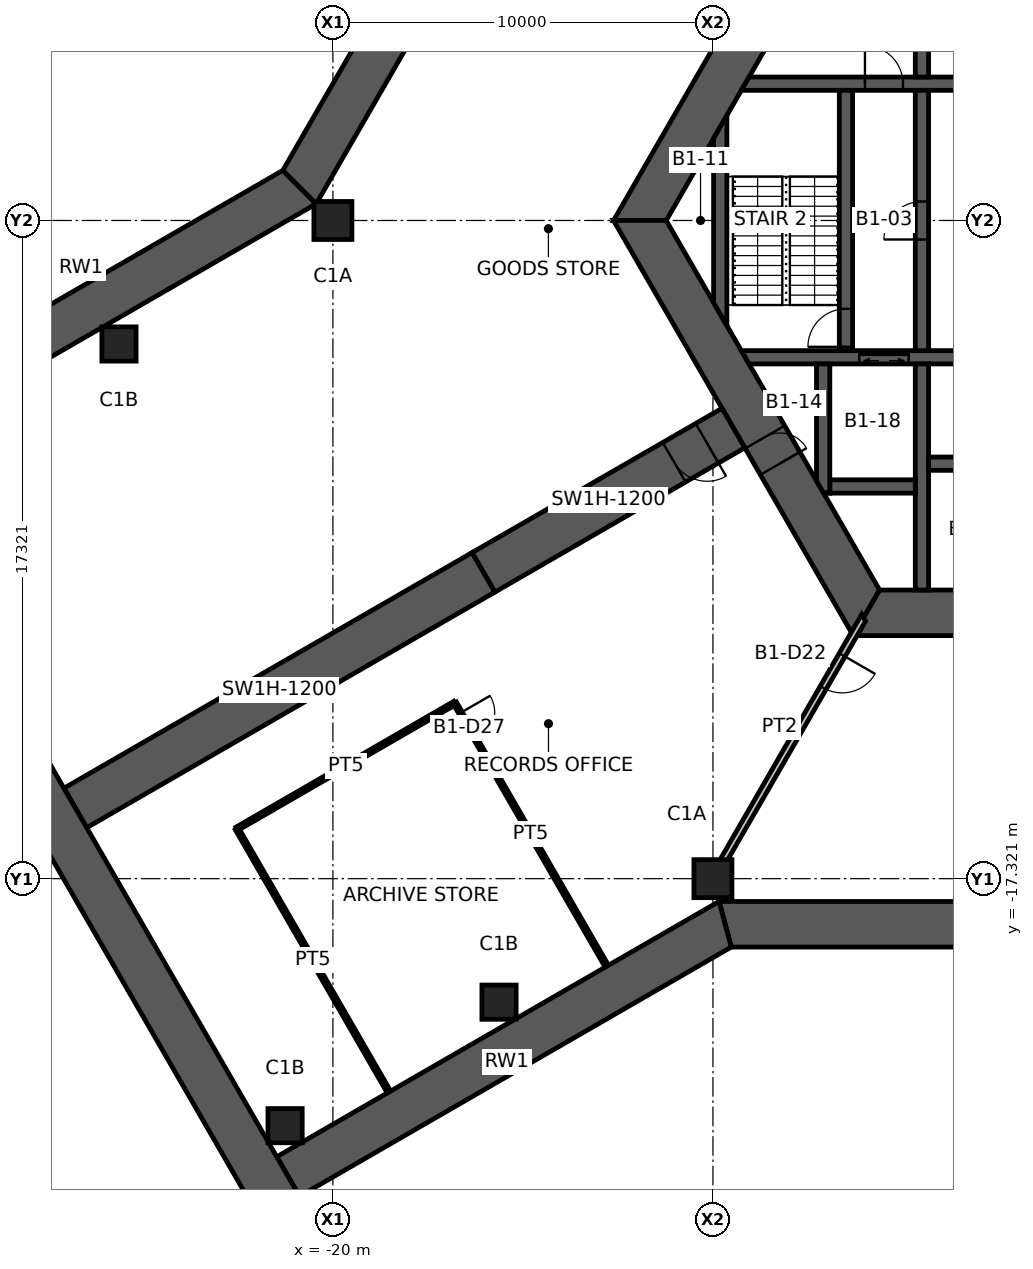
"""IFC4 building model, lengths in metres.
Left out: names, types, materials, properties, quantities, classifications, styles, units other than length and angle.
Written with IfcOpenShell. Run it as: python <this file> out.ifc"""

import sys

from ifc_helpers import new_model, si_unit, direction, frame, frame_2d, origin, origin_2d, place, context, subcontext, project, spatial, polyline, rectangle, hollow_rectangle, outline, extrude, element, fill, save


model = new_model("IFC4")
c1 = context("Model", 3, precision=1e-05, world=origin(), true_north=direction((0.0, 1.0)))
c2 = subcontext(c1, "Body", "Model", "MODEL_VIEW")
j1 = project(units=[si_unit("LENGTHUNIT", "METRE"), si_unit("PLANEANGLEUNIT", "RADIAN")], contexts=[c1])
p1 = place(None, origin())
s1 = spatial("IfcSite", under=j1, at=p1, CompositionType="ELEMENT")
p2 = place(p1, origin())
s2 = spatial("IfcBuilding", under=s1, at=p2, CompositionType="ELEMENT")
p3 = place(p2, frame((0.0, 0.0, -5.0)))
s3 = spatial("IfcBuildingStorey", under=s2, at=p3, CompositionType="ELEMENT", Elevation=-5.0)
for number, where, z_axis, x_axis in (
    (1, (-20.0, 0.0, 0.0), (0.0, 0.0, 1.0), (1.0, 0.0, 0.0)),
    (2, (-10.0, -17.321, 0.0), (0.0, 0.0, 1.0), (1.0, 0.0, 0.0)),
):
    element("IfcColumn", number, at=place(p3, frame(where, z_axis=z_axis, x_axis=x_axis)), inside=s3, PredefinedType="COLUMN", context=c2, shape_type="SweptSolid", body=[
        extrude(hollow_rectangle(XDim=1.0, YDim=1.0, WallThickness=0.06, at=origin_2d()), origin(), (0.0, 0.0, 1.0), 5.0),
    ])
for number, where, z_axis, x_axis in (
    (3, (-25.629, -3.25, 0.0), (0.0, 0.0, 1.0), (1.0, 0.0, 0.0)),
    (4, (-15.629, -20.571, 0.0), (0.0, 0.0, 1.0), (1.0, 0.0, 0.0)),
    (5, (-21.258, -23.821, 0.0), (0.0, 0.0, 1.0), (1.0, 0.0, 0.0)),
):
    element("IfcColumn", number, at=place(p3, frame(where, z_axis=z_axis, x_axis=x_axis)), inside=s3, PredefinedType="COLUMN", context=c2, shape_type="SweptSolid", body=[
        extrude(hollow_rectangle(XDim=0.9, YDim=0.9, WallThickness=0.05, at=origin_2d()), origin(), (0.0, 0.0, 1.0), 5.0),
    ])
p4 = place(p3, frame((-5.961, 10.325, 0.0), z_axis=(0.0, 0.0, 1.0), x_axis=(-0.500004296715, -0.866022923061, 0.0)))
e6 = element("IfcWall", 6, at=p4, inside=s3, PredefinedType="SHEAR", context=c2, shape_type="SweptSolid", body=[
    extrude(outline(polyline([(-0.346, -0.6), (4.494, -0.6), (5.494, -0.6), (12.269, -0.6), (11.576, 0.6), (5.494, 0.6), (4.494, 0.6), (0.346, 0.6), (-0.346, -0.6)])), origin(), (0.0, 0.0, 1.0), 5.0),
])
p5 = place(p4, frame((4.494, 0.0, 0.0)))
e7 = element("IfcOpeningElement", 7, at=p5, cuts=e6, PredefinedType="OPENING", context=c2, shape_type="SweptSolid", body=[
    extrude(rectangle(XDim=1.0, YDim=2.1, at=frame_2d((0.5, 1.05))), frame((0.0, 0.61, 0.0), z_axis=(0.0, -1.0, 0.0), x_axis=(1.0, 0.0, 0.0)), (0.0, 0.0, 1.0), 1.22),
])
p6 = place(p3, frame((-11.922, 0.0, 0.0), z_axis=(0.0, 0.0, 1.0), x_axis=(0.500004296715, -0.866022923061, 0.0)))
e8 = element("IfcWall", 8, at=p6, inside=s3, PredefinedType="SHEAR", context=c2, shape_type="SweptSolid", body=[
    extrude(outline(polyline([(-0.346, -0.6), (6.581, -0.6), (7.381, -0.6), (12.269, -0.6), (11.576, 0.6), (7.381, 0.6), (6.581, 0.6), (0.346, 0.6), (-0.346, -0.6)])), origin(), (0.0, 0.0, 1.0), 5.0),
])
p7 = place(p6, frame((6.581, 0.0, 0.0)))
e9 = element("IfcOpeningElement", 9, at=p7, cuts=e8, PredefinedType="OPENING", context=c2, shape_type="SweptSolid", body=[
    extrude(rectangle(XDim=0.8, YDim=2.1, at=frame_2d((0.4, 1.05))), frame((0.0, 0.61, 0.0), z_axis=(0.0, -1.0, 0.0), x_axis=(1.0, 0.0, 0.0)), (0.0, 0.0, 1.0), 1.22),
])
p8 = place(p3, frame((-5.961, -10.325, 0.0), z_axis=(0.0, 0.0, 1.0), x_axis=(1.0, 0.0, 0.0)))
e10 = element("IfcWall", 10, at=p8, inside=s3, PredefinedType="SHEAR", context=c2, shape_type="SweptSolid", body=[
    extrude(outline(polyline([(-0.346, -0.6), (5.461, -0.6), (6.461, -0.6), (12.269, -0.6), (11.576, 0.6), (6.461, 0.6), (5.461, 0.6), (0.346, 0.6), (-0.346, -0.6)])), origin(), (0.0, 0.0, 1.0), 5.0),
])
p9 = place(p8, frame((5.461, 0.0, 0.0)))
e11 = element("IfcOpeningElement", 11, at=p9, cuts=e10, PredefinedType="OPENING", context=c2, shape_type="SweptSolid", body=[
    extrude(rectangle(XDim=1.0, YDim=2.1, at=frame_2d((0.5, 1.05))), frame((0.0, 0.61, 0.0), z_axis=(0.0, -1.0, 0.0), x_axis=(1.0, 0.0, 0.0)), (0.0, 0.0, 1.0), 1.22),
])
p10 = place(p3, frame((-9.461, -5.462, 0.0), z_axis=(0.0, 0.0, 1.0), x_axis=(-0.866019116917, -0.500010889016, 0.0)))
e12 = element("IfcWall", 12, at=p10, inside=s3, PredefinedType="SHEAR", context=c2, shape_type="SweptSolid", body=[
    extrude(rectangle(XDim=7.595, YDim=1.2, at=frame_2d((3.798, 0.0))), origin(), (0.0, 0.0, 1.0), 5.0),
])
p11 = place(p10, frame((0.8, 0.0, 0.0)))
e13 = element("IfcOpeningElement", 13, at=p11, cuts=e12, PredefinedType="OPENING", context=c2, shape_type="SweptSolid", body=[
    extrude(rectangle(XDim=1.0, YDim=2.1, at=frame_2d((0.5, 1.05))), frame((0.0, 0.61, 0.0), z_axis=(0.0, -1.0, 0.0), x_axis=(1.0, 0.0, 0.0)), (0.0, 0.0, 1.0), 1.22),
])
p12 = place(p3, frame((-16.039, -9.26, 0.0), z_axis=(0.0, 0.0, 1.0), x_axis=(-0.866023285932, -0.50000366821, 0.0)))
e14 = element("IfcWall", 14, at=p12, inside=s3, PredefinedType="SHEAR", context=c2, shape_type="SweptSolid", body=[
    extrude(rectangle(XDim=12.4, YDim=1.2, at=frame_2d((6.2, 0.0))), origin(), (0.0, 0.0, 1.0), 5.0),
])
p13 = place(p3, frame((-32.378, -5.761, 0.0), z_axis=(0.0, 0.0, 1.0), x_axis=(0.866028209229, 0.499995140796, 0.0)))
e15 = element("IfcWall", 15, at=p13, inside=s3, PredefinedType="SOLIDWALL", context=c2, shape_type="SweptSolid", body=[
    extrude(outline(polyline([(0.0, -0.6), (13.439, -0.6), (13.118, 0.6), (0.0, 0.6), (0.0, -0.6)])), origin(), (0.0, 0.0, 1.0), 5.0),
])
for number, where, z_axis, x_axis in (
    (16, (-20.878, 0.878, 0.0), (0.0, 0.0, 1.0), (0.5, 0.866, 0.0)),
    (17, (9.678, -18.521, 0.0), (0.0, 0.0, 1.0), (-1.0, 0.0, 0.0)),
):
    element("IfcWall", number, at=place(p3, frame(where, z_axis=z_axis, x_axis=x_axis)), inside=s3, PredefinedType="SOLIDWALL", context=c2, shape_type="SweptSolid", body=[
        extrude(outline(polyline([(-0.161, -0.6), (19.518, -0.6), (19.196, 0.6), (0.161, 0.6), (-0.161, -0.6)])), origin(), (0.0, 0.0, 1.0), 5.0),
    ])
p14 = place(p3, frame((-9.678, -18.521, 0.0), z_axis=(0.0, 0.0, 1.0), x_axis=(-0.866028209229, -0.499995140796, 0.0)))
e18 = element("IfcWall", 18, at=p14, inside=s3, PredefinedType="SOLIDWALL", context=c2, shape_type="SweptSolid", body=[
    extrude(outline(polyline([(-0.161, -0.6), (13.279, -0.6), (13.279, 0.6), (0.161, 0.6), (-0.161, -0.6)])), origin(), (0.0, 0.0, 1.0), 5.0),
])
p15 = place(p3, frame((-21.397, -25.979, 0.0), z_axis=(0.0, 0.0, 1.0), x_axis=(-0.500005427746, 0.866022270051, 0.0)))
e19 = element("IfcWall", 19, at=p15, inside=s3, PredefinedType="SOLIDWALL", context=c2, shape_type="SweptSolid", body=[
    extrude(rectangle(XDim=23.6, YDim=1.2, at=frame_2d((11.8, 0.0))), origin(), (0.0, 0.0, 1.0), 5.0),
])
p16 = place(p3, frame((-9.151, 3.6, 0.0), z_axis=(0.0, 0.0, 1.0), x_axis=(1.0, 0.0, 0.0)))
e20 = element("IfcWall", 20, at=p16, inside=s3, PredefinedType="SHEAR", context=c2, shape_type="SweptSolid", body=[
    extrude(outline(polyline([(-0.101, -0.175), (3.151, -0.175), (4.151, -0.175), (7.726, -0.175), (7.726, 0.175), (4.151, 0.175), (3.151, 0.175), (0.101, 0.175), (-0.101, -0.175)])), origin(), (0.0, 0.0, 1.0), 5.0),
])
p17 = place(p16, frame((3.151, 0.0, 0.0)))
e21 = element("IfcOpeningElement", 21, at=p17, cuts=e20, PredefinedType="OPENING", context=c2, shape_type="SweptSolid", body=[
    extrude(rectangle(XDim=1.0, YDim=2.1, at=frame_2d((0.5, 1.05))), frame((0.0, 0.185, 0.0), z_axis=(0.0, -1.0, 0.0), x_axis=(1.0, 0.0, 0.0)), (0.0, 0.0, 1.0), 0.37),
])
p18 = place(p3, frame((-9.151, -3.6, 0.0), z_axis=(0.0, 0.0, 1.0), x_axis=(1.0, 0.0, 0.0)))
e22 = element("IfcWall", 22, at=p18, inside=s3, PredefinedType="SHEAR", context=c2, shape_type="SweptSolid", body=[
    extrude(outline(polyline([(0.101, -0.175), (3.001, -0.175), (4.301, -0.175), (7.726, -0.175), (7.726, 0.175), (4.301, 0.175), (3.001, 0.175), (-0.101, 0.175), (0.101, -0.175)])), origin(), (0.0, 0.0, 1.0), 5.0),
])
p19 = place(p18, frame((3.001, 0.0, 0.0)))
e23 = element("IfcOpeningElement", 23, at=p19, cuts=e22, PredefinedType="OPENING", context=c2, shape_type="SweptSolid", body=[
    extrude(rectangle(XDim=1.3, YDim=2.1, at=frame_2d((0.65, 1.05))), frame((0.0, 0.185, 0.0), z_axis=(0.0, -1.0, 0.0), x_axis=(1.0, 0.0, 0.0)), (0.0, 0.0, 1.0), 0.37),
])
p20 = place(p3, frame((-4.5, -3.425, 0.0), z_axis=(0.0, 0.0, 1.0), x_axis=(0.0, 1.0, 0.0)))
e24 = element("IfcWall", 24, at=p20, inside=s3, PredefinedType="SHEAR", context=c2, shape_type="SweptSolid", body=[
    extrude(rectangle(XDim=6.85, YDim=0.35, at=frame_2d((3.425, 0.0))), origin(), (0.0, 0.0, 1.0), 5.0),
])
p21 = place(p20, frame((2.925, 0.0, 0.0)))
e25 = element("IfcOpeningElement", 25, at=p21, cuts=e24, PredefinedType="OPENING", context=c2, shape_type="SweptSolid", body=[
    extrude(rectangle(XDim=1.0, YDim=2.1, at=frame_2d((0.5, 1.05))), frame((0.0, 0.185, 0.0), z_axis=(0.0, -1.0, 0.0), x_axis=(1.0, 0.0, 0.0)), (0.0, 0.0, 1.0), 0.37),
])
p22 = place(p3, frame((-6.5, -3.425, 0.0), z_axis=(0.0, 0.0, 1.0), x_axis=(0.0, 1.0, 0.0)))
e26 = element("IfcWall", 26, at=p22, inside=s3, PredefinedType="SHEAR", context=c2, shape_type="SweptSolid", body=[
    extrude(rectangle(XDim=6.85, YDim=0.35, at=frame_2d((3.425, 0.0))), origin(), (0.0, 0.0, 1.0), 5.0),
])
p23 = place(p22, frame((0.1, 0.0, 0.0)))
e27 = element("IfcOpeningElement", 27, at=p23, cuts=e26, PredefinedType="OPENING", context=c2, shape_type="SweptSolid", body=[
    extrude(rectangle(XDim=1.0, YDim=2.1, at=frame_2d((0.5, 1.05))), frame((0.0, 0.185, 0.0), z_axis=(0.0, -1.0, 0.0), x_axis=(1.0, 0.0, 0.0)), (0.0, 0.0, 1.0), 0.37),
])
for number, where, z_axis, x_axis in (
    (28, (-4.5, 3.775, 0.0), (0.0, 0.0, 1.0), (0.0, 1.0, 0.0)),
    (29, (-4.5, -3.775, 0.0), (0.0, 0.0, 1.0), (0.0, -1.0, 0.0)),
):
    element("IfcWall", number, at=place(p3, frame(where, z_axis=z_axis, x_axis=x_axis)), inside=s3, PredefinedType="SHEAR", context=c2, shape_type="SweptSolid", body=[
        extrude(rectangle(XDim=5.95, YDim=0.35, at=frame_2d((2.975, 0.0))), origin(), (0.0, 0.0, 1.0), 5.0),
    ])
p24 = place(p3, frame((-4.325, -6.4, 0.0), z_axis=(0.0, 0.0, 1.0), x_axis=(1.0, 0.0, 0.0)))
e30 = element("IfcWall", 30, at=p24, inside=s3, PredefinedType="SHEAR", context=c2, shape_type="SweptSolid", body=[
    extrude(rectangle(XDim=2.55, YDim=0.35, at=frame_2d((1.275, 0.0))), origin(), (0.0, 0.0, 1.0), 5.0),
])
p25 = place(p3, frame((-6.925, -7.0, 0.0), z_axis=(0.0, 0.0, 1.0), x_axis=(1.0, 0.0, 0.0)))
e31 = element("IfcWall", 31, at=p25, inside=s3, PredefinedType="SHEAR", context=c2, shape_type="SweptSolid", body=[
    extrude(rectangle(XDim=2.25, YDim=0.35, at=frame_2d((1.125, 0.0))), origin(), (0.0, 0.0, 1.0), 5.0),
])
p26 = place(p3, frame((-7.1, -3.775, 0.0), z_axis=(0.0, 0.0, 1.0), x_axis=(0.0, -1.0, 0.0)))
e32 = element("IfcWall", 32, at=p26, inside=s3, PredefinedType="SHEAR", context=c2, shape_type="SweptSolid", body=[
    extrude(outline(polyline([(0.0, -0.175), (3.074, -0.175), (3.377, 0.0), (3.4, 0.175), (0.0, 0.175), (0.0, -0.175)])), origin(), (0.0, 0.0, 1.0), 5.0),
])
p27 = place(p3, frame((-9.808, -2.462, 0.0), z_axis=(0.0, 0.0, 1.0), x_axis=(0.0, 1.0, 0.0)))
e33 = element("IfcWall", 33, at=p27, inside=s3, PredefinedType="SHEAR", context=c2, shape_type="SweptSolid", body=[
    extrude(outline(polyline([(-0.303, -0.175), (5.228, -0.175), (4.621, 0.175), (0.303, 0.175), (-0.303, -0.175)])), origin(), (0.0, 0.0, 1.0), 5.0),
])
p28 = place(p3, frame((-6.035, -10.453, 0.0), z_axis=(0.0, 0.0, 1.0), x_axis=(-0.499993402427, -0.866029212861, 0.0)))
e34 = element("IfcWall", 34, at=p28, inside=s3, PredefinedType="PARTITIONING", context=c2, shape_type="SweptSolid", body=[
    extrude(outline(polyline([(-0.051, -0.087), (1.129, -0.087), (2.129, -0.087), (7.93, -0.087), (7.93, 0.087), (2.129, 0.087), (1.129, 0.087), (0.051, 0.087), (-0.051, -0.087)])), origin(), (0.0, 0.0, 1.0), 3.8),
])
p29 = place(p28, frame((1.129, 0.0, 0.0)))
e35 = element("IfcOpeningElement", 35, at=p29, cuts=e34, PredefinedType="OPENING", context=c2, shape_type="SweptSolid", body=[
    extrude(rectangle(XDim=1.0, YDim=2.1, at=frame_2d((0.5, 1.05))), frame((0.0, 0.098, 0.0), z_axis=(0.0, -1.0, 0.0), x_axis=(1.0, 0.0, 0.0)), (0.0, 0.0, 1.0), 0.195),
])
p30 = place(p3, frame((-22.525, -16.007, 0.0), z_axis=(0.0, 0.0, 1.0), x_axis=(0.866021597574, 0.500006592492, 0.0)))
e36 = element("IfcWall", 36, at=p30, inside=s3, PredefinedType="PARTITIONING", context=c2, shape_type="SweptSolid", body=[
    extrude(rectangle(XDim=6.62, YDim=0.1, at=frame_2d((3.31, 0.0))), origin(), (0.0, 0.0, 1.0), 3.7),
])
p31 = place(p3, frame((-18.525, -22.934, 0.0), z_axis=(0.0, 0.0, 1.0), x_axis=(-0.500006030964, 0.866021921778, 0.0)))
e37 = element("IfcWall", 37, at=p31, inside=s3, PredefinedType="PARTITIONING", context=c2, shape_type="SweptSolid", body=[
    extrude(rectangle(XDim=7.999, YDim=0.1, at=frame_2d((4.0, 0.0))), origin(), (0.0, 0.0, 1.0), 3.7),
])
p32 = place(p3, frame((-16.792, -12.697, 0.0), z_axis=(0.0, 0.0, 1.0), x_axis=(0.499998759335, -0.866026120082, 0.0)))
e38 = element("IfcWall", 38, at=p32, inside=s3, PredefinedType="PARTITIONING", context=c2, shape_type="SweptSolid", body=[
    extrude(rectangle(XDim=7.98, YDim=0.1, at=frame_2d((3.99, 0.0))), origin(), (0.0, 0.0, 1.0), 3.7),
])
p33 = place(p32, frame((0.3, 0.0, 0.0)))
e39 = element("IfcOpeningElement", 39, at=p33, cuts=e38, PredefinedType="OPENING", context=c2, shape_type="SweptSolid", body=[
    extrude(rectangle(XDim=0.9, YDim=2.1, at=frame_2d((0.45, 1.05))), frame((0.0, 0.06, 0.0), z_axis=(0.0, -1.0, 0.0), x_axis=(1.0, 0.0, 0.0)), (0.0, 0.0, 1.0), 0.12),
])
p34 = place(p7, origin())
e40 = element("IfcDoor", 40, at=p34, inside=s3, OperationType="SINGLE_SWING_RIGHT", PredefinedType="DOOR", context=c2, shape_type="SweptSolid", body=[
    extrude(rectangle(XDim=0.8, YDim=2.1, at=frame_2d((0.4, 1.05))), frame((0.0, 0.025, 0.0), z_axis=(0.0, -1.0, 0.0), x_axis=(1.0, 0.0, 0.0)), (0.0, 0.0, 1.0), 0.05),
])
fill(e9, e40)
p35 = place(p21, origin())
e41 = element("IfcDoor", 41, at=p35, inside=s3, OperationType="SINGLE_SWING_LEFT", PredefinedType="DOOR", context=c2, shape_type="SweptSolid", body=[
    extrude(rectangle(XDim=1.0, YDim=2.1, at=frame_2d((0.5, 1.05))), frame((0.0, 0.025, 0.0), z_axis=(0.0, -1.0, 0.0), x_axis=(1.0, 0.0, 0.0)), (0.0, 0.0, 1.0), 0.05),
])
fill(e25, e41)
p36 = place(p23, origin())
e42 = element("IfcDoor", 42, at=p36, inside=s3, OperationType="SINGLE_SWING_LEFT", PredefinedType="DOOR", context=c2, shape_type="SweptSolid", body=[
    extrude(rectangle(XDim=1.0, YDim=2.1, at=frame_2d((0.5, 1.05))), frame((0.0, 0.025, 0.0), z_axis=(0.0, -1.0, 0.0), x_axis=(1.0, 0.0, 0.0)), (0.0, 0.0, 1.0), 0.05),
])
fill(e27, e42)
p37 = place(p17, origin())
e43 = element("IfcDoor", 43, at=p37, inside=s3, OperationType="SINGLE_SWING_LEFT", PredefinedType="DOOR", context=c2, shape_type="SweptSolid", body=[
    extrude(rectangle(XDim=1.0, YDim=2.1, at=frame_2d((0.5, 1.05))), frame((0.0, 0.025, 0.0), z_axis=(0.0, -1.0, 0.0), x_axis=(1.0, 0.0, 0.0)), (0.0, 0.0, 1.0), 0.05),
])
fill(e21, e43)
p38 = place(p11, origin())
e44 = element("IfcDoor", 44, at=p38, inside=s3, OperationType="SINGLE_SWING_LEFT", PredefinedType="DOOR", context=c2, shape_type="SweptSolid", body=[
    extrude(rectangle(XDim=1.0, YDim=2.1, at=frame_2d((0.5, 1.05))), frame((0.0, 0.025, 0.0), z_axis=(0.0, -1.0, 0.0), x_axis=(1.0, 0.0, 0.0)), (0.0, 0.0, 1.0), 0.05),
])
fill(e13, e44)
p39 = place(p29, origin())
e45 = element("IfcDoor", 45, at=p39, inside=s3, OperationType="SINGLE_SWING_LEFT", PredefinedType="DOOR", context=c2, shape_type="SweptSolid", body=[
    extrude(rectangle(XDim=1.0, YDim=2.1, at=frame_2d((0.5, 1.05))), frame((0.0, 0.025, 0.0), z_axis=(0.0, -1.0, 0.0), x_axis=(1.0, 0.0, 0.0)), (0.0, 0.0, 1.0), 0.05),
])
fill(e35, e45)
p40 = place(p33, origin())
e46 = element("IfcDoor", 46, at=p40, inside=s3, OperationType="SINGLE_SWING_LEFT", PredefinedType="DOOR", context=c2, shape_type="SweptSolid", body=[
    extrude(rectangle(XDim=0.9, YDim=2.1, at=frame_2d((0.45, 1.05))), frame((0.0, 0.025, 0.0), z_axis=(0.0, -1.0, 0.0), x_axis=(1.0, 0.0, 0.0)), (0.0, 0.0, 1.0), 0.05),
])
fill(e39, e46)
p41 = place(p19, origin())
e47 = element("IfcDoor", 47, at=p41, inside=s3, OperationType="DOUBLE_DOOR_SLIDING", PredefinedType="DOOR", context=c2, shape_type="SweptSolid", body=[
    extrude(rectangle(XDim=1.3, YDim=2.1, at=frame_2d((0.65, 1.05))), frame((0.0, 0.025, 0.0), z_axis=(0.0, -1.0, 0.0), x_axis=(1.0, 0.0, 0.0)), (0.0, 0.0, 1.0), 0.05),
])
fill(e23, e47)
save(model, sys.argv[1])
